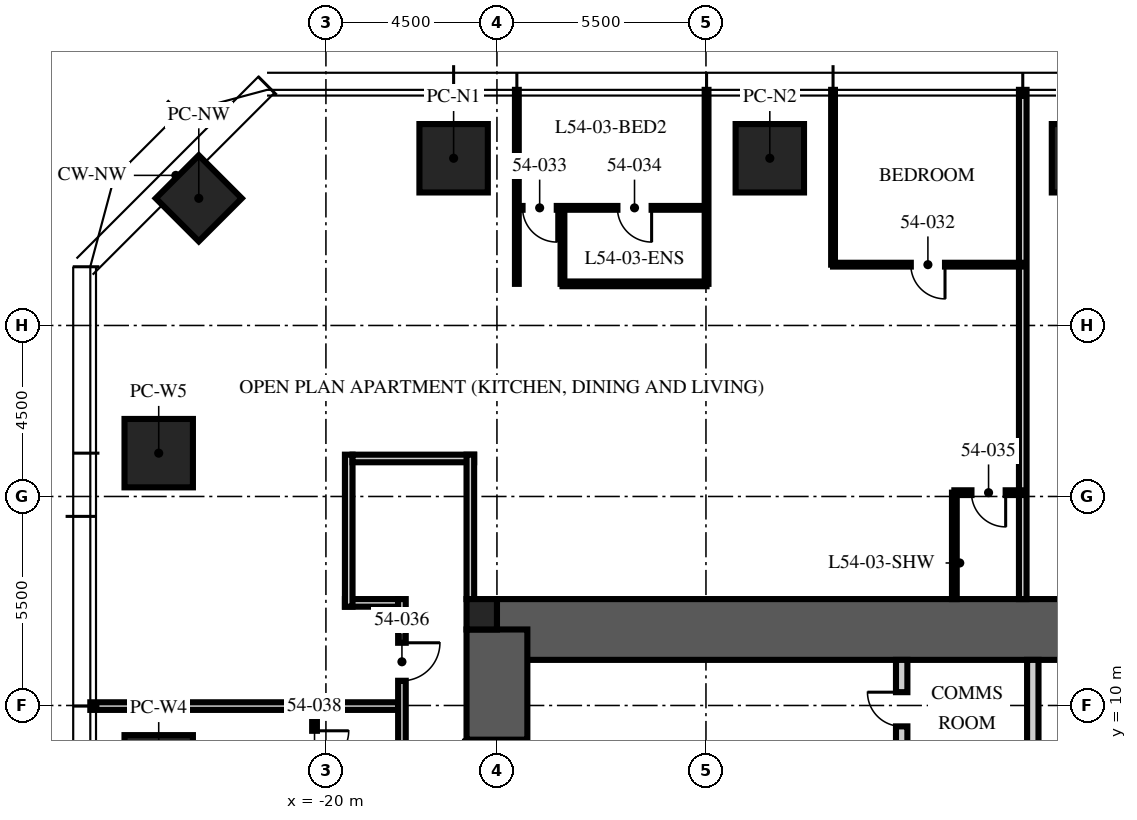
"""IFC4 building model, lengths in metres.
Left out: names, types, materials, properties, quantities, classifications, styles, units other than length and angle.
Written with IfcOpenShell. Run it as: python <this file> out.ifc"""

import sys

from ifc_helpers import new_model, si_unit, direction, frame, frame_2d, origin, origin_2d, place, context, subcontext, project, spatial, rectangle, extrude, element, fill, save


model = new_model("IFC4")
c1 = context("Model", 3, precision=1e-05, world=origin(), true_north=direction((0.0, 1.0)))
c2 = subcontext(c1, "Body", "Model", "MODEL_VIEW")
j1 = project(units=[si_unit("LENGTHUNIT", "METRE"), si_unit("PLANEANGLEUNIT", "RADIAN")], contexts=[c1])
p1 = place(None, origin())
s1 = spatial("IfcSite", under=j1, at=p1, CompositionType="ELEMENT")
p2 = place(p1, origin())
s2 = spatial("IfcBuilding", under=s1, at=p2, CompositionType="ELEMENT")
p3 = place(p2, frame((0.0, 0.0, 218.25)))
s3 = spatial("IfcBuildingStorey", under=s2, at=p3, CompositionType="ELEMENT", Elevation=218.25)
p4 = place(p3, frame((-15.5, 12.0, -0.25), z_axis=(0.0, 0.0, 1.0), x_axis=(1.0, 0.0, 0.0)))
e1 = element("IfcWall", 1, at=p4, inside=s3, PredefinedType="SHEAR", context=c2, shape_type="SweptSolid", body=[
    extrude(rectangle(XDim=31.0, YDim=1.6, at=frame_2d((15.5, 0.0))), origin(), (0.0, 0.0, 1.0), 3.75),
])
p5 = place(p3, frame((-15.5, -12.0, -0.25), z_axis=(0.0, 0.0, 1.0), x_axis=(0.0, 1.0, 0.0)))
e2 = element("IfcWall", 2, at=p5, inside=s3, PredefinedType="SHEAR", context=c2, shape_type="SweptSolid", body=[
    extrude(rectangle(XDim=24.0, YDim=1.6, at=frame_2d((12.0, 0.0))), origin(), (0.0, 0.0, 1.0), 3.75),
])
p6 = place(p5, frame((3.2, 0.0, 0.25)))
e3 = element("IfcOpeningElement", 3, at=p6, cuts=e2, PredefinedType="OPENING", context=c2, shape_type="SweptSolid", body=[
    extrude(rectangle(XDim=1.2, YDim=2.1, at=frame_2d((0.6, 1.05))), frame((0.0, 0.81, 0.0), z_axis=(0.0, -1.0, 0.0), x_axis=(1.0, 0.0, 0.0)), (0.0, 0.0, 1.0), 1.62),
])
p7 = place(p5, frame((19.3, 0.0, 0.25)))
e4 = element("IfcOpeningElement", 4, at=p7, cuts=e2, PredefinedType="OPENING", context=c2, shape_type="SweptSolid", body=[
    extrude(rectangle(XDim=1.8, YDim=2.1, at=frame_2d((0.9, 1.05))), frame((0.0, 0.81, 0.0), z_axis=(0.0, -1.0, 0.0), x_axis=(1.0, 0.0, 0.0)), (0.0, 0.0, 1.0), 1.62),
])
p8 = place(p3, frame((-15.9, 12.4, -0.25), z_axis=(0.0, 0.0, 1.0), x_axis=(1.0, 0.0, 0.0)))
e5 = element("IfcColumn", 5, at=p8, inside=s3, PredefinedType="COLUMN", context=c2, shape_type="SweptSolid", body=[
    extrude(rectangle(XDim=0.8, YDim=0.8, at=origin_2d()), origin(), (0.0, 0.0, 1.0), 3.75),
])
for number, where, z_axis, x_axis in (
    (6, (-16.64, 24.4, 0.0), (0.0, 0.0, 1.0), (1.0, 0.0, 0.0)),
    (7, (-8.32, 24.4, 0.0), (0.0, 0.0, 1.0), (1.0, 0.0, 0.0)),
    (8, (0.0, 24.4, 0.0), (0.0, 0.0, 1.0), (1.0, 0.0, 0.0)),
    (9, (-24.4, 8.32, 0.0), (0.0, 0.0, 1.0), (0.0, 1.0, 0.0)),
    (10, (-24.4, 16.64, 0.0), (0.0, 0.0, 1.0), (0.0, 1.0, 0.0)),
):
    element("IfcColumn", number, at=place(p3, frame(where, z_axis=z_axis, x_axis=x_axis)), inside=s3, PredefinedType="COLUMN", context=c2, shape_type="SweptSolid", body=[
        extrude(rectangle(XDim=1.8, YDim=1.8, at=origin_2d()), origin(), (0.0, 0.0, 1.0), 3.75),
    ])
p9 = place(p3, frame((-23.346, 23.346, 0.0), z_axis=(0.0, 0.0, 1.0), x_axis=(0.707106781187, 0.707106781187, 0.0)))
e11 = element("IfcColumn", 11, at=p9, inside=s3, PredefinedType="COLUMN", context=c2, shape_type="SweptSolid", body=[
    extrude(rectangle(XDim=1.6, YDim=1.6, at=origin_2d()), origin(), (0.0, 0.0, 1.0), 3.75),
])
p10 = place(p3, frame((-4.85, 5.3, 0.0), z_axis=(0.0, 0.0, 1.0), x_axis=(0.0, 1.0, 0.0)))
e12 = element("IfcWall", 12, at=p10, inside=s3, PredefinedType="PARTITIONING", context=c2, shape_type="SweptSolid", body=[
    extrude(rectangle(XDim=5.9, YDim=0.3, at=frame_2d((2.95, 0.0))), origin(), (0.0, 0.0, 1.0), 3.5),
])
p11 = place(p10, frame((4.15, 0.0, 0.0)))
e13 = element("IfcOpeningElement", 13, at=p11, cuts=e12, PredefinedType="OPENING", context=c2, shape_type="SweptSolid", body=[
    extrude(rectangle(XDim=0.9, YDim=2.1, at=frame_2d((0.45, 1.05))), frame((0.0, 0.16, 0.0), z_axis=(0.0, -1.0, 0.0), x_axis=(1.0, 0.0, 0.0)), (0.0, 0.0, 1.0), 0.32),
])
p12 = place(p3, frame((-1.4, 8.5, 0.0), z_axis=(0.0, 0.0, 1.0), x_axis=(0.0, 1.0, 0.0)))
e14 = element("IfcWall", 14, at=p12, inside=s3, PredefinedType="PARTITIONING", context=c2, shape_type="SweptSolid", body=[
    extrude(rectangle(XDim=2.7, YDim=0.3, at=frame_2d((1.35, 0.0))), origin(), (0.0, 0.0, 1.0), 3.5),
])
p13 = place(p3, frame((-18.1, 12.7, 0.0), z_axis=(0.0, 0.0, 1.0), x_axis=(-1.0, 0.0, 0.0)))
e15 = element("IfcWall", 15, at=p13, inside=s3, PredefinedType="PARTITIONING", context=c2, shape_type="SweptSolid", body=[
    extrude(rectangle(XDim=1.4, YDim=0.2, at=frame_2d((0.7, 0.0))), origin(), (0.0, 0.0, 1.0), 2.81),
])
p14 = place(p3, frame((-19.4, 12.6, 0.0), z_axis=(0.0, 0.0, 1.0), x_axis=(0.0, 1.0, 0.0)))
e16 = element("IfcWall", 16, at=p14, inside=s3, PredefinedType="PARTITIONING", context=c2, shape_type="SweptSolid", body=[
    extrude(rectangle(XDim=4.0, YDim=0.2, at=frame_2d((2.0, 0.0))), origin(), (0.0, 0.0, 1.0), 2.6),
])
p15 = place(p3, frame((-19.3, 16.5, 0.0), z_axis=(0.0, 0.0, 1.0), x_axis=(1.0, 0.0, 0.0)))
e17 = element("IfcWall", 17, at=p15, inside=s3, PredefinedType="PARTITIONING", context=c2, shape_type="SweptSolid", body=[
    extrude(rectangle(XDim=3.2, YDim=0.2, at=frame_2d((1.6, 0.0))), origin(), (0.0, 0.0, 1.0), 2.3),
])
p16 = place(p3, frame((-16.2, 16.6, 0.0), z_axis=(0.0, 0.0, 1.0), x_axis=(0.0, -1.0, 0.0)))
e18 = element("IfcWall", 18, at=p16, inside=s3, PredefinedType="PARTITIONING", context=c2, shape_type="SweptSolid", body=[
    extrude(rectangle(XDim=3.8, YDim=0.2, at=frame_2d((1.9, 0.0))), origin(), (0.0, 0.0, 1.0), 2.3),
])
p17 = place(p3, frame((-1.664, 12.8, 0.0), z_axis=(0.0, 0.0, 1.0), x_axis=(0.0, 1.0, 0.0)))
e19 = element("IfcWall", 19, at=p17, inside=s3, PredefinedType="PARTITIONING", context=c2, shape_type="SweptSolid", body=[
    extrude(rectangle(XDim=13.4, YDim=0.2, at=frame_2d((6.7, 0.0))), origin(), (0.0, 0.0, 1.0), 2.91),
])
p18 = place(p3, frame((-6.656, 21.6, 0.0), z_axis=(0.0, 0.0, 1.0), x_axis=(0.0, 1.0, 0.0)))
e20 = element("IfcWall", 20, at=p18, inside=s3, PredefinedType="PARTITIONING", context=c2, shape_type="SweptSolid", body=[
    extrude(rectangle(XDim=4.6, YDim=0.1, at=frame_2d((2.3, 0.0))), origin(), (0.0, 0.0, 1.0), 2.91),
])
for number, where, z_axis, x_axis in (
    (21, (-9.984, 21.095, 0.0), (0.0, 0.0, 1.0), (0.0, 1.0, 0.0)),
    (22, (-14.976, 21.095, 0.0), (0.0, 0.0, 1.0), (0.0, 1.0, 0.0)),
):
    element("IfcWall", number, at=place(p3, frame(where, z_axis=z_axis, x_axis=x_axis)), inside=s3, PredefinedType="PARTITIONING", context=c2, shape_type="SweptSolid", body=[
        extrude(rectangle(XDim=5.105, YDim=0.1, at=frame_2d((2.552, 0.0))), origin(), (0.0, 0.0, 1.0), 2.91),
    ])
p19 = place(p3, frame((-18.1, 9.984, 0.0), z_axis=(0.0, 0.0, 1.0), x_axis=(-1.0, 0.0, 0.0)))
e23 = element("IfcWall", 23, at=p19, inside=s3, PredefinedType="PARTITIONING", context=c2, shape_type="SweptSolid", body=[
    extrude(rectangle(XDim=8.1, YDim=0.2, at=frame_2d((4.05, 0.0))), origin(), (0.0, 0.0, 1.0), 2.91),
])
p20 = place(p3, frame((-1.664, 21.6, 0.0), z_axis=(0.0, 0.0, 1.0), x_axis=(-1.0, 0.0, 0.0)))
e24 = element("IfcWall", 24, at=p20, inside=s3, PredefinedType="PARTITIONING", context=c2, shape_type="SweptSolid", body=[
    extrude(rectangle(XDim=4.992, YDim=0.1, at=frame_2d((2.496, 0.0))), origin(), (0.0, 0.0, 1.0), 2.81),
])
p21 = place(p20, frame((2.046, 0.0, 0.0)))
e25 = element("IfcOpeningElement", 25, at=p21, cuts=e24, PredefinedType="OPENING", context=c2, shape_type="SweptSolid", body=[
    extrude(rectangle(XDim=0.9, YDim=2.1, at=frame_2d((0.45, 1.05))), frame((0.0, 0.06, 0.0), z_axis=(0.0, -1.0, 0.0), x_axis=(1.0, 0.0, 0.0)), (0.0, 0.0, 1.0), 0.12),
])
p22 = place(p3, frame((-9.984, 23.095, 0.0), z_axis=(0.0, 0.0, 1.0), x_axis=(-1.0, 0.0, 0.0)))
e26 = element("IfcWall", 26, at=p22, inside=s3, PredefinedType="PARTITIONING", context=c2, shape_type="SweptSolid", body=[
    extrude(rectangle(XDim=4.992, YDim=0.1, at=frame_2d((2.496, 0.0))), origin(), (0.0, 0.0, 1.0), 2.81),
])
p23 = place(p22, frame((3.942, 0.0, 0.0)))
e27 = element("IfcOpeningElement", 27, at=p23, cuts=e26, PredefinedType="OPENING", context=c2, shape_type="SweptSolid", body=[
    extrude(rectangle(XDim=0.9, YDim=2.1, at=frame_2d((0.45, 1.05))), frame((0.0, 0.06, 0.0), z_axis=(0.0, -1.0, 0.0), x_axis=(1.0, 0.0, 0.0)), (0.0, 0.0, 1.0), 0.12),
])
p24 = place(p22, frame((1.446, 0.0, 0.0)))
e28 = element("IfcOpeningElement", 28, at=p24, cuts=e26, PredefinedType="OPENING", context=c2, shape_type="SweptSolid", body=[
    extrude(rectangle(XDim=0.9, YDim=2.1, at=frame_2d((0.45, 1.05))), frame((0.0, 0.06, 0.0), z_axis=(0.0, -1.0, 0.0), x_axis=(1.0, 0.0, 0.0)), (0.0, 0.0, 1.0), 0.12),
])
p25 = place(p3, frame((-13.776, 21.095, 0.0), z_axis=(0.0, 0.0, 1.0), x_axis=(0.0, 1.0, 0.0)))
e29 = element("IfcWall", 29, at=p25, inside=s3, PredefinedType="PARTITIONING", context=c2, shape_type="SweptSolid", body=[
    extrude(rectangle(XDim=2.0, YDim=0.1, at=frame_2d((1.0, 0.0))), origin(), (0.0, 0.0, 1.0), 3.5),
])
p26 = place(p3, frame((-9.984, 21.095, 0.0), z_axis=(0.0, 0.0, 1.0), x_axis=(-1.0, 0.0, 0.0)))
e30 = element("IfcWall", 30, at=p26, inside=s3, PredefinedType="PARTITIONING", context=c2, shape_type="SweptSolid", body=[
    extrude(rectangle(XDim=3.792, YDim=0.125, at=frame_2d((1.896, 0.0))), origin(), (0.0, 0.0, 1.0), 2.81),
])
p27 = place(p3, frame((-1.664, 15.6, 0.0), z_axis=(0.0, 0.0, 1.0), x_axis=(-1.0, 0.0, 0.0)))
e31 = element("IfcWall", 31, at=p27, inside=s3, PredefinedType="PARTITIONING", context=c2, shape_type="SweptSolid", body=[
    extrude(rectangle(XDim=1.8, YDim=0.125, at=frame_2d((0.9, 0.0))), origin(), (0.0, 0.0, 1.0), 3.5),
])
p28 = place(p27, frame((0.45, 0.0, 0.0)))
e32 = element("IfcOpeningElement", 32, at=p28, cuts=e31, PredefinedType="OPENING", context=c2, shape_type="SweptSolid", body=[
    extrude(rectangle(XDim=0.9, YDim=2.1, at=frame_2d((0.45, 1.05))), frame((0.0, 0.073, 0.0), z_axis=(0.0, -1.0, 0.0), x_axis=(1.0, 0.0, 0.0)), (0.0, 0.0, 1.0), 0.145),
])
p29 = place(p3, frame((-3.464, 12.8, 0.0), z_axis=(0.0, 0.0, 1.0), x_axis=(0.0, 1.0, 0.0)))
e33 = element("IfcWall", 33, at=p29, inside=s3, PredefinedType="PARTITIONING", context=c2, shape_type="SweptSolid", body=[
    extrude(rectangle(XDim=2.8, YDim=0.125, at=frame_2d((1.4, 0.0))), origin(), (0.0, 0.0, 1.0), 3.5),
])
p30 = place(p3, frame((-20.3, 9.984, 0.0), z_axis=(0.0, 0.0, 1.0), x_axis=(0.0, -1.0, 0.0)))
e34 = element("IfcWall", 34, at=p30, inside=s3, PredefinedType="PARTITIONING", context=c2, shape_type="SweptSolid", body=[
    extrude(rectangle(XDim=2.2, YDim=0.125, at=frame_2d((1.1, 0.0))), origin(), (0.0, 0.0, 1.0), 2.6),
])
p31 = place(p30, frame((0.65, 0.0, 0.0)))
e35 = element("IfcOpeningElement", 35, at=p31, cuts=e34, PredefinedType="OPENING", context=c2, shape_type="SweptSolid", body=[
    extrude(rectangle(XDim=0.9, YDim=2.1, at=frame_2d((0.45, 1.05))), frame((0.0, 0.073, 0.0), z_axis=(0.0, -1.0, 0.0), x_axis=(1.0, 0.0, 0.0)), (0.0, 0.0, 1.0), 0.145),
])
p32 = place(p3, frame((-18.0, 12.8, 0.0), z_axis=(0.0, 0.0, 1.0), x_axis=(0.0, -1.0, 0.0)))
e36 = element("IfcWall", 36, at=p32, inside=s3, PredefinedType="PARTITIONING", context=c2, shape_type="SweptSolid", body=[
    extrude(rectangle(XDim=25.8, YDim=0.2, at=frame_2d((12.9, 0.0))), origin(), (0.0, 0.0, 1.0), 2.6),
])
p33 = place(p32, frame((1.15, 0.0, 0.0)))
e37 = element("IfcOpeningElement", 37, at=p33, cuts=e36, PredefinedType="OPENING", context=c2, shape_type="SweptSolid", body=[
    extrude(rectangle(XDim=1.0, YDim=2.2, at=frame_2d((0.5, 1.1))), frame((0.0, 0.11, 0.0), z_axis=(0.0, -1.0, 0.0), x_axis=(1.0, 0.0, 0.0)), (0.0, 0.0, 1.0), 0.22),
])
p34 = place(p32, frame((12.836, 0.0, 0.0)))
e38 = element("IfcOpeningElement", 38, at=p34, cuts=e36, PredefinedType="OPENING", context=c2, shape_type="SweptSolid", body=[
    extrude(rectangle(XDim=1.0, YDim=2.2, at=frame_2d((0.5, 1.1))), frame((0.0, 0.11, 0.0), z_axis=(0.0, -1.0, 0.0), x_axis=(1.0, 0.0, 0.0)), (0.0, 0.0, 1.0), 0.22),
])
p35 = place(p32, frame((23.484, 0.0, 0.0)))
e39 = element("IfcOpeningElement", 39, at=p35, cuts=e36, PredefinedType="OPENING", context=c2, shape_type="SweptSolid", body=[
    extrude(rectangle(XDim=1.0, YDim=2.2, at=frame_2d((0.5, 1.1))), frame((0.0, 0.11, 0.0), z_axis=(0.0, -1.0, 0.0), x_axis=(1.0, 0.0, 0.0)), (0.0, 0.0, 1.0), 0.22),
])
p36 = place(p7, origin())
e40 = element("IfcDoor", 40, at=p36, inside=s3, OperationType="DOUBLE_DOOR_SINGLE_SWING", PredefinedType="DOOR", context=c2, shape_type="SweptSolid", body=[
    extrude(rectangle(XDim=1.8, YDim=2.1, at=frame_2d((0.9, 1.05))), frame((0.0, 0.025, 0.0), z_axis=(0.0, -1.0, 0.0), x_axis=(1.0, 0.0, 0.0)), (0.0, 0.0, 1.0), 0.05),
])
fill(e4, e40)
p37 = place(p11, origin())
e41 = element("IfcDoor", 41, at=p37, inside=s3, OperationType="SINGLE_SWING_RIGHT", PredefinedType="DOOR", context=c2, shape_type="SweptSolid", body=[
    extrude(rectangle(XDim=0.9, YDim=2.1, at=frame_2d((0.45, 1.05))), frame((0.0, 0.025, 0.0), z_axis=(0.0, -1.0, 0.0), x_axis=(1.0, 0.0, 0.0)), (0.0, 0.0, 1.0), 0.05),
])
fill(e13, e41)
p38 = place(p21, origin())
e42 = element("IfcDoor", 42, at=p38, inside=s3, OperationType="SINGLE_SWING_LEFT", PredefinedType="DOOR", context=c2, shape_type="SweptSolid", body=[
    extrude(rectangle(XDim=0.9, YDim=2.1, at=frame_2d((0.45, 1.05))), frame((0.0, 0.025, 0.0), z_axis=(0.0, -1.0, 0.0), x_axis=(1.0, 0.0, 0.0)), (0.0, 0.0, 1.0), 0.05),
])
fill(e25, e42)
p39 = place(p23, origin())
e43 = element("IfcDoor", 43, at=p39, inside=s3, OperationType="SINGLE_SWING_LEFT", PredefinedType="DOOR", context=c2, shape_type="SweptSolid", body=[
    extrude(rectangle(XDim=0.9, YDim=2.1, at=frame_2d((0.45, 1.05))), frame((0.0, 0.025, 0.0), z_axis=(0.0, -1.0, 0.0), x_axis=(1.0, 0.0, 0.0)), (0.0, 0.0, 1.0), 0.05),
])
fill(e27, e43)
p40 = place(p24, origin())
e44 = element("IfcDoor", 44, at=p40, inside=s3, OperationType="SINGLE_SWING_LEFT", PredefinedType="DOOR", context=c2, shape_type="SweptSolid", body=[
    extrude(rectangle(XDim=0.9, YDim=2.1, at=frame_2d((0.45, 1.05))), frame((0.0, 0.025, 0.0), z_axis=(0.0, -1.0, 0.0), x_axis=(1.0, 0.0, 0.0)), (0.0, 0.0, 1.0), 0.05),
])
fill(e28, e44)
p41 = place(p28, origin())
e45 = element("IfcDoor", 45, at=p41, inside=s3, OperationType="SINGLE_SWING_LEFT", PredefinedType="DOOR", context=c2, shape_type="SweptSolid", body=[
    extrude(rectangle(XDim=0.9, YDim=2.1, at=frame_2d((0.45, 1.05))), frame((0.0, 0.025, 0.0), z_axis=(0.0, -1.0, 0.0), x_axis=(1.0, 0.0, 0.0)), (0.0, 0.0, 1.0), 0.05),
])
fill(e32, e45)
p42 = place(p33, origin())
e46 = element("IfcDoor", 46, at=p42, inside=s3, OperationType="SINGLE_SWING_LEFT", PredefinedType="DOOR", context=c2, shape_type="SweptSolid", body=[
    extrude(rectangle(XDim=1.0, YDim=2.2, at=frame_2d((0.5, 1.1))), frame((0.0, 0.025, 0.0), z_axis=(0.0, -1.0, 0.0), x_axis=(1.0, 0.0, 0.0)), (0.0, 0.0, 1.0), 0.05),
])
fill(e37, e46)
p43 = place(p31, origin())
e47 = element("IfcDoor", 47, at=p43, inside=s3, OperationType="SINGLE_SWING_LEFT", PredefinedType="DOOR", context=c2, shape_type="SweptSolid", body=[
    extrude(rectangle(XDim=0.9, YDim=2.1, at=frame_2d((0.45, 1.05))), frame((0.0, 0.025, 0.0), z_axis=(0.0, -1.0, 0.0), x_axis=(1.0, 0.0, 0.0)), (0.0, 0.0, 1.0), 0.05),
])
fill(e35, e47)
save(model, sys.argv[1])
